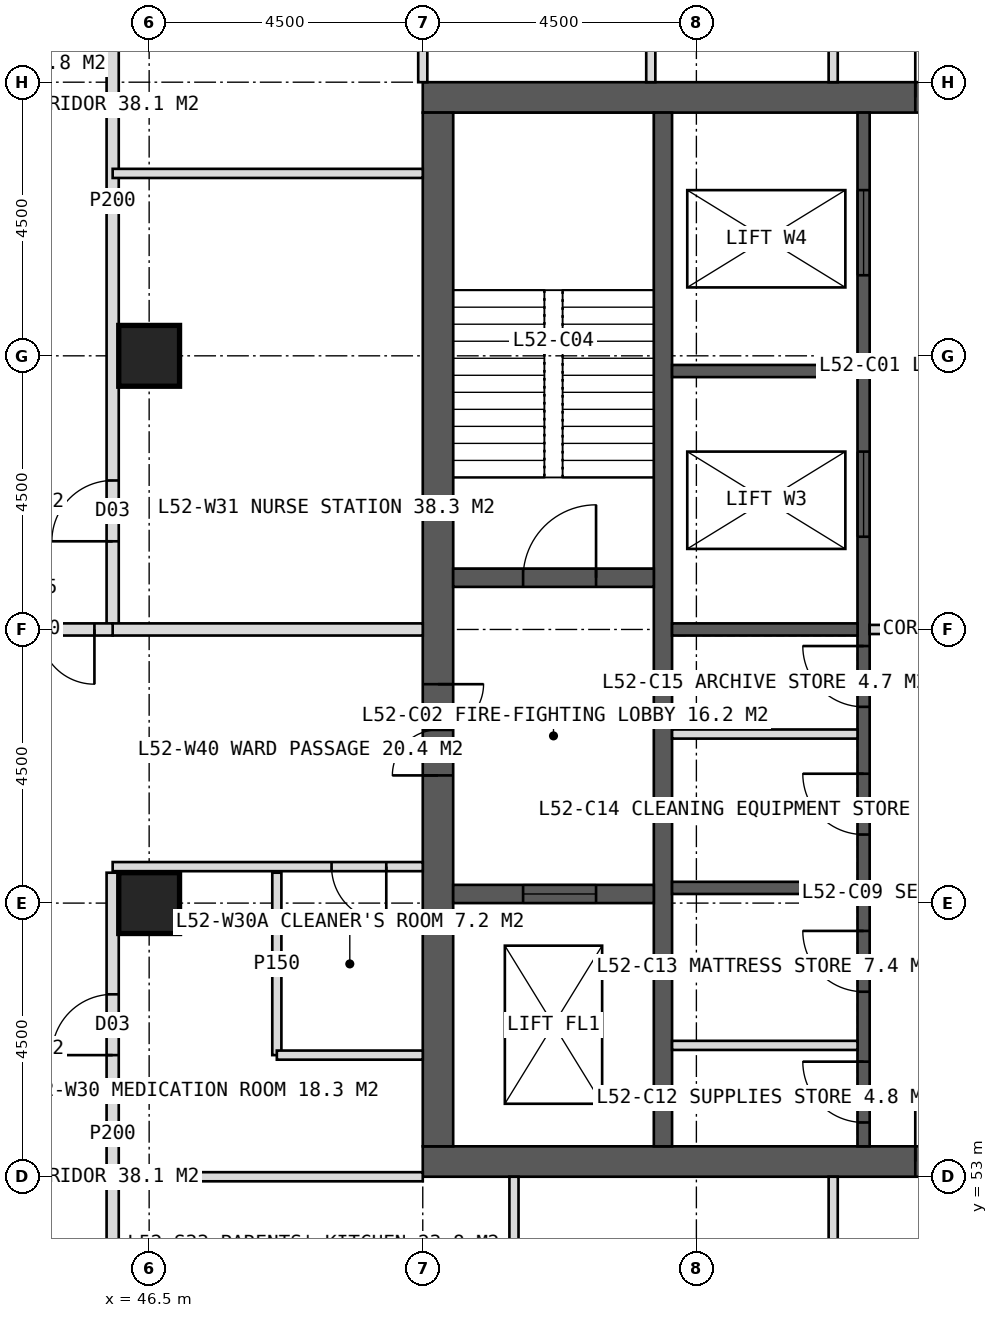
"""IFC4 building model, lengths in metres.
Left out: names, types, materials, properties, quantities, classifications, styles, units other than length and angle.
Written with IfcOpenShell. Run it as: python <this file> out.ifc"""

import sys

from ifc_helpers import new_model, si_unit, direction, frame, frame_2d, origin, origin_2d, place, context, subcontext, project, spatial, rectangle, hollow_rectangle, extrude, element, fill, save


model = new_model("IFC4")
c1 = context("Model", 3, precision=1e-05, world=origin(), true_north=direction((0.0, 1.0)))
c2 = subcontext(c1, "Body", "Model", "MODEL_VIEW")
j1 = project(units=[si_unit("LENGTHUNIT", "METRE"), si_unit("PLANEANGLEUNIT", "RADIAN")], contexts=[c1])
p1 = place(None, origin())
s1 = spatial("IfcSite", under=j1, at=p1, CompositionType="ELEMENT")
p2 = place(p1, origin())
s2 = spatial("IfcBuilding", under=s1, at=p2, CompositionType="ELEMENT")
p3 = place(p2, frame((0.0, 0.0, 217.0)))
s3 = spatial("IfcBuildingStorey", under=s2, at=p3, CompositionType="ELEMENT", Elevation=217.0)
p4 = place(p3, frame((51.0, 70.75, 0.0), z_axis=(0.0, 0.0, 1.0), x_axis=(1.0, 0.0, 0.0)))
e1 = element("IfcWall", 1, at=p4, inside=s3, PredefinedType="SHEAR", context=c2, shape_type="SweptSolid", body=[
    extrude(rectangle(XDim=18.0, YDim=0.5, at=frame_2d((9.0, 0.0))), origin(), (0.0, 0.0, 1.0), 4.0),
])
p5 = place(p4, frame((8.1, 0.0, 0.0)))
e2 = element("IfcOpeningElement", 2, at=p5, cuts=e1, PredefinedType="OPENING", context=c2, shape_type="SweptSolid", body=[
    extrude(rectangle(XDim=1.8, YDim=2.2, at=frame_2d((0.9, 1.1))), frame((0.0, 0.26, 0.0), z_axis=(0.0, -1.0, 0.0), x_axis=(1.0, 0.0, 0.0)), (0.0, 0.0, 1.0), 0.52),
])
p6 = place(p3, frame((51.0, 53.25, 0.0), z_axis=(0.0, 0.0, 1.0), x_axis=(1.0, 0.0, 0.0)))
e3 = element("IfcWall", 3, at=p6, inside=s3, PredefinedType="SHEAR", context=c2, shape_type="SweptSolid", body=[
    extrude(rectangle(XDim=18.0, YDim=0.5, at=frame_2d((9.0, 0.0))), origin(), (0.0, 0.0, 1.0), 4.0),
])
p7 = place(p6, frame((8.1, 0.0, 0.0)))
e4 = element("IfcOpeningElement", 4, at=p7, cuts=e3, PredefinedType="OPENING", context=c2, shape_type="SweptSolid", body=[
    extrude(rectangle(XDim=1.8, YDim=2.2, at=frame_2d((0.9, 1.1))), frame((0.0, 0.26, 0.0), z_axis=(0.0, -1.0, 0.0), x_axis=(1.0, 0.0, 0.0)), (0.0, 0.0, 1.0), 0.52),
])
p8 = place(p3, frame((51.25, 53.5, 0.0), z_axis=(0.0, 0.0, 1.0), x_axis=(0.0, 1.0, 0.0)))
e5 = element("IfcWall", 5, at=p8, inside=s3, PredefinedType="SHEAR", context=c2, shape_type="SweptSolid", body=[
    extrude(rectangle(XDim=17.0, YDim=0.5, at=frame_2d((8.5, 0.0))), origin(), (0.0, 0.0, 1.0), 4.0),
])
p9 = place(p8, frame((6.1, 0.0, 0.0)))
e6 = element("IfcOpeningElement", 6, at=p9, cuts=e5, PredefinedType="OPENING", context=c2, shape_type="SweptSolid", body=[
    extrude(rectangle(XDim=1.5, YDim=2.2, at=frame_2d((0.75, 1.1))), frame((0.0, 0.26, 0.0), z_axis=(0.0, -1.0, 0.0), x_axis=(1.0, 0.0, 0.0)), (0.0, 0.0, 1.0), 0.52),
])
p10 = place(p3, frame((54.95, 53.5, 0.0), z_axis=(0.0, 0.0, 1.0), x_axis=(0.0, 1.0, 0.0)))
e7 = element("IfcWall", 7, at=p10, inside=s3, PredefinedType="SHEAR", context=c2, shape_type="SweptSolid", body=[
    extrude(rectangle(XDim=17.0, YDim=0.3, at=frame_2d((8.5, 0.0))), origin(), (0.0, 0.0, 1.0), 4.0),
])
p11 = place(p3, frame((58.25, 53.5, 0.0), z_axis=(0.0, 0.0, 1.0), x_axis=(0.0, 1.0, 0.0)))
e8 = element("IfcWall", 8, at=p11, inside=s3, PredefinedType="SHEAR", context=c2, shape_type="SweptSolid", body=[
    extrude(rectangle(XDim=17.0, YDim=0.2, at=frame_2d((8.5, 0.0))), origin(), (0.0, 0.0, 1.0), 4.0),
])
p12 = place(p11, frame((0.393, 0.0, 0.0)))
e9 = element("IfcOpeningElement", 9, at=p12, cuts=e8, PredefinedType="OPENING", context=c2, shape_type="SweptSolid", body=[
    extrude(rectangle(XDim=1.0, YDim=2.1, at=frame_2d((0.5, 1.05))), frame((0.0, 0.11, 0.0), z_axis=(0.0, -1.0, 0.0), x_axis=(1.0, 0.0, 0.0)), (0.0, 0.0, 1.0), 0.22),
])
p13 = place(p11, frame((2.542, 0.0, 0.0)))
e10 = element("IfcOpeningElement", 10, at=p13, cuts=e8, PredefinedType="OPENING", context=c2, shape_type="SweptSolid", body=[
    extrude(rectangle(XDim=1.0, YDim=2.1, at=frame_2d((0.5, 1.05))), frame((0.0, 0.11, 0.0), z_axis=(0.0, -1.0, 0.0), x_axis=(1.0, 0.0, 0.0)), (0.0, 0.0, 1.0), 0.22),
])
p14 = place(p11, frame((5.127, 0.0, 0.0)))
e11 = element("IfcOpeningElement", 11, at=p14, cuts=e8, PredefinedType="OPENING", context=c2, shape_type="SweptSolid", body=[
    extrude(rectangle(XDim=1.0, YDim=2.1, at=frame_2d((0.5, 1.05))), frame((0.0, 0.11, 0.0), z_axis=(0.0, -1.0, 0.0), x_axis=(1.0, 0.0, 0.0)), (0.0, 0.0, 1.0), 0.22),
])
p15 = place(p11, frame((7.228, 0.0, 0.0)))
e12 = element("IfcOpeningElement", 12, at=p15, cuts=e8, PredefinedType="OPENING", context=c2, shape_type="SweptSolid", body=[
    extrude(rectangle(XDim=1.0, YDim=2.1, at=frame_2d((0.5, 1.05))), frame((0.0, 0.11, 0.0), z_axis=(0.0, -1.0, 0.0), x_axis=(1.0, 0.0, 0.0)), (0.0, 0.0, 1.0), 0.22),
])
p16 = place(p11, frame((10.025, 0.0, 0.0)))
e13 = element("IfcOpeningElement", 13, at=p16, cuts=e8, PredefinedType="OPENING", context=c2, shape_type="SweptSolid", body=[
    extrude(rectangle(XDim=1.4, YDim=2.2, at=frame_2d((0.7, 1.1))), frame((0.0, 0.11, 0.0), z_axis=(0.0, -1.0, 0.0), x_axis=(1.0, 0.0, 0.0)), (0.0, 0.0, 1.0), 0.22),
])
p17 = place(p11, frame((14.325, 0.0, 0.0)))
e14 = element("IfcOpeningElement", 14, at=p17, cuts=e8, PredefinedType="OPENING", context=c2, shape_type="SweptSolid", body=[
    extrude(rectangle(XDim=1.4, YDim=2.2, at=frame_2d((0.7, 1.1))), frame((0.0, 0.11, 0.0), z_axis=(0.0, -1.0, 0.0), x_axis=(1.0, 0.0, 0.0)), (0.0, 0.0, 1.0), 0.22),
])
for number, where, z_axis, x_axis in (
    (15, (55.1, 57.75, 0.0), (0.0, 0.0, 1.0), (1.0, 0.0, 0.0)),
    (16, (55.1, 62.0, 0.0), (0.0, 0.0, 1.0), (1.0, 0.0, 0.0)),
    (17, (55.1, 66.25, 0.0), (0.0, 0.0, 1.0), (1.0, 0.0, 0.0)),
):
    element("IfcWall", number, at=place(p3, frame(where, z_axis=z_axis, x_axis=x_axis)), inside=s3, PredefinedType="SHEAR", context=c2, shape_type="SweptSolid", body=[
        extrude(rectangle(XDim=3.05, YDim=0.2, at=frame_2d((1.525, 0.0))), origin(), (0.0, 0.0, 1.0), 4.0),
    ])
p18 = place(p3, frame((51.5, 62.85, 0.0), z_axis=(0.0, 0.0, 1.0), x_axis=(1.0, 0.0, 0.0)))
e18 = element("IfcWall", 18, at=p18, inside=s3, PredefinedType="SHEAR", context=c2, shape_type="SweptSolid", body=[
    extrude(rectangle(XDim=3.3, YDim=0.3, at=frame_2d((1.65, 0.0))), origin(), (0.0, 0.0, 1.0), 4.0),
])
p19 = place(p18, frame((1.15, 0.0, 0.0)))
e19 = element("IfcOpeningElement", 19, at=p19, cuts=e18, PredefinedType="OPENING", context=c2, shape_type="SweptSolid", body=[
    extrude(rectangle(XDim=1.2, YDim=2.1, at=frame_2d((0.6, 1.05))), frame((0.0, 0.16, 0.0), z_axis=(0.0, -1.0, 0.0), x_axis=(1.0, 0.0, 0.0)), (0.0, 0.0, 1.0), 0.32),
])
p20 = place(p3, frame((51.5, 57.65, 0.0), z_axis=(0.0, 0.0, 1.0), x_axis=(1.0, 0.0, 0.0)))
e20 = element("IfcWall", 20, at=p20, inside=s3, PredefinedType="SHEAR", context=c2, shape_type="SweptSolid", body=[
    extrude(rectangle(XDim=3.3, YDim=0.3, at=frame_2d((1.65, 0.0))), origin(), (0.0, 0.0, 1.0), 4.0),
])
p21 = place(p20, frame((1.15, 0.0, 0.0)))
e21 = element("IfcOpeningElement", 21, at=p21, cuts=e20, PredefinedType="OPENING", context=c2, shape_type="SweptSolid", body=[
    extrude(rectangle(XDim=1.2, YDim=2.2, at=frame_2d((0.6, 1.1))), frame((0.0, 0.16, 0.0), z_axis=(0.0, -1.0, 0.0), x_axis=(1.0, 0.0, 0.0)), (0.0, 0.0, 1.0), 0.32),
])
for number, where, z_axis, x_axis in (
    (22, (46.5, 57.5, 0.0), (0.0, 0.0, 1.0), (1.0, 0.0, 0.0)),
    (23, (46.5, 66.5, 0.0), (0.0, 0.0, 1.0), (1.0, 0.0, 0.0)),
):
    element("IfcColumn", number, at=place(p3, frame(where, z_axis=z_axis, x_axis=x_axis)), inside=s3, PredefinedType="COLUMN", context=c2, shape_type="SweptSolid", body=[
        extrude(hollow_rectangle(XDim=1.0, YDim=1.0, WallThickness=0.1, at=origin_2d()), origin(), (0.0, 0.0, 1.0), 4.0),
    ])
p22 = place(p3, frame((51.0, 71.0, 0.0), z_axis=(0.0, 0.0, 1.0), x_axis=(0.0, 1.0, 0.0)))
e24 = element("IfcWall", 24, at=p22, inside=s3, PredefinedType="PARTITIONING", context=c2, shape_type="SweptSolid", body=[
    extrude(rectangle(XDim=5.1, YDim=0.15, at=frame_2d((2.55, 0.0))), origin(), (0.0, 0.0, 1.0), 3.75),
])
p23 = place(p3, frame((57.75, 71.0, 0.0), z_axis=(0.0, 0.0, 1.0), x_axis=(0.0, 1.0, 0.0)))
e25 = element("IfcWall", 25, at=p23, inside=s3, PredefinedType="PARTITIONING", context=c2, shape_type="SweptSolid", body=[
    extrude(rectangle(XDim=3.6, YDim=0.15, at=frame_2d((1.8, 0.0))), origin(), (0.0, 0.0, 1.0), 3.75),
])
p24 = place(p23, frame((0.6, 0.0, 0.0)))
e26 = element("IfcOpeningElement", 26, at=p24, cuts=e25, PredefinedType="OPENING", context=c2, shape_type="SweptSolid", body=[
    extrude(rectangle(XDim=0.9, YDim=2.1, at=frame_2d((0.45, 1.05))), frame((0.0, 0.085, 0.0), z_axis=(0.0, -1.0, 0.0), x_axis=(1.0, 0.0, 0.0)), (0.0, 0.0, 1.0), 0.17),
])
p25 = place(p3, frame((54.75, 71.0, 0.0), z_axis=(0.0, 0.0, 1.0), x_axis=(0.0, 1.0, 0.0)))
e27 = element("IfcWall", 27, at=p25, inside=s3, PredefinedType="PARTITIONING", context=c2, shape_type="SweptSolid", body=[
    extrude(rectangle(XDim=2.4, YDim=0.15, at=frame_2d((1.2, 0.0))), origin(), (0.0, 0.0, 1.0), 3.75),
])
p26 = place(p3, frame((51.0, 53.0, 0.0), z_axis=(0.0, 0.0, 1.0), x_axis=(-1.0, 0.0, 0.0)))
e28 = element("IfcWall", 28, at=p26, inside=s3, PredefinedType="PARTITIONING", context=c2, shape_type="SweptSolid", body=[
    extrude(rectangle(XDim=5.1, YDim=0.15, at=frame_2d((2.55, 0.0))), origin(), (0.0, 0.0, 1.0), 3.75),
])
p27 = place(p3, frame((45.9, 49.4, 0.0), z_axis=(0.0, 0.0, 1.0), x_axis=(0.0, 1.0, 0.0)))
e29 = element("IfcWall", 29, at=p27, inside=s3, PredefinedType="PARTITIONING", context=c2, shape_type="SweptSolid", body=[
    extrude(rectangle(XDim=8.6, YDim=0.2, at=frame_2d((4.3, 0.0))), origin(), (0.0, 0.0, 1.0), 3.75),
])
p28 = place(p27, frame((5.6, 0.0, 0.0)))
e30 = element("IfcOpeningElement", 30, at=p28, cuts=e29, PredefinedType="OPENING", context=c2, shape_type="SweptSolid", body=[
    extrude(rectangle(XDim=1.0, YDim=2.1, at=frame_2d((0.5, 1.05))), frame((0.0, 0.11, 0.0), z_axis=(0.0, -1.0, 0.0), x_axis=(1.0, 0.0, 0.0)), (0.0, 0.0, 1.0), 0.22),
])
p29 = place(p3, frame((45.9, 62.0, 0.0), z_axis=(0.0, 0.0, 1.0), x_axis=(0.0, 1.0, 0.0)))
e31 = element("IfcWall", 31, at=p29, inside=s3, PredefinedType="PARTITIONING", context=c2, shape_type="SweptSolid", body=[
    extrude(rectangle(XDim=14.1, YDim=0.2, at=frame_2d((7.05, 0.0))), origin(), (0.0, 0.0, 1.0), 3.75),
])
p30 = place(p29, frame((1.45, 0.0, 0.0)))
e32 = element("IfcOpeningElement", 32, at=p30, cuts=e31, PredefinedType="OPENING", context=c2, shape_type="SweptSolid", body=[
    extrude(rectangle(XDim=1.0, YDim=2.1, at=frame_2d((0.5, 1.05))), frame((0.0, 0.11, 0.0), z_axis=(0.0, -1.0, 0.0), x_axis=(1.0, 0.0, 0.0)), (0.0, 0.0, 1.0), 0.22),
])
p31 = place(p29, frame((10.3, 0.0, 0.0)))
e33 = element("IfcOpeningElement", 33, at=p31, cuts=e31, PredefinedType="OPENING", context=c2, shape_type="SweptSolid", body=[
    extrude(rectangle(XDim=1.0, YDim=2.1, at=frame_2d((0.5, 1.05))), frame((0.0, 0.11, 0.0), z_axis=(0.0, -1.0, 0.0), x_axis=(1.0, 0.0, 0.0)), (0.0, 0.0, 1.0), 0.22),
])
p32 = place(p3, frame((51.0, 58.1, 0.0), z_axis=(0.0, 0.0, 1.0), x_axis=(-1.0, 0.0, 0.0)))
e34 = element("IfcWall", 34, at=p32, inside=s3, PredefinedType="PARTITIONING", context=c2, shape_type="SweptSolid", body=[
    extrude(rectangle(XDim=5.1, YDim=0.15, at=frame_2d((2.55, 0.0))), origin(), (0.0, 0.0, 1.0), 3.75),
])
p33 = place(p32, frame((0.6, 0.0, 0.0)))
e35 = element("IfcOpeningElement", 35, at=p33, cuts=e34, PredefinedType="OPENING", context=c2, shape_type="SweptSolid", body=[
    extrude(rectangle(XDim=0.9, YDim=2.1, at=frame_2d((0.45, 1.05))), frame((0.0, 0.085, 0.0), z_axis=(0.0, -1.0, 0.0), x_axis=(1.0, 0.0, 0.0)), (0.0, 0.0, 1.0), 0.17),
])
p34 = place(p3, frame((51.0, 62.0, 0.0), z_axis=(0.0, 0.0, 1.0), x_axis=(-1.0, 0.0, 0.0)))
e36 = element("IfcWall", 36, at=p34, inside=s3, PredefinedType="SOLIDWALL", context=c2, shape_type="SweptSolid", body=[
    extrude(rectangle(XDim=5.1, YDim=0.2, at=frame_2d((2.55, 0.0))), origin(), (0.0, 0.0, 1.0), 2.95),
])
p35 = place(p3, frame((51.0, 69.5, 0.0), z_axis=(0.0, 0.0, 1.0), x_axis=(-1.0, 0.0, 0.0)))
e37 = element("IfcWall", 37, at=p35, inside=s3, PredefinedType="PARTITIONING", context=c2, shape_type="SweptSolid", body=[
    extrude(rectangle(XDim=5.1, YDim=0.15, at=frame_2d((2.55, 0.0))), origin(), (0.0, 0.0, 1.0), 3.75),
])
p36 = place(p3, frame((48.6, 55.0, 0.0), z_axis=(0.0, 0.0, 1.0), x_axis=(0.0, 1.0, 0.0)))
e38 = element("IfcWall", 38, at=p36, inside=s3, PredefinedType="PARTITIONING", context=c2, shape_type="SweptSolid", body=[
    extrude(rectangle(XDim=3.0, YDim=0.15, at=frame_2d((1.5, 0.0))), origin(), (0.0, 0.0, 1.0), 3.75),
])
p37 = place(p3, frame((51.0, 55.0, 0.0), z_axis=(0.0, 0.0, 1.0), x_axis=(-1.0, 0.0, 0.0)))
e39 = element("IfcWall", 39, at=p37, inside=s3, PredefinedType="PARTITIONING", context=c2, shape_type="SweptSolid", body=[
    extrude(rectangle(XDim=2.4, YDim=0.15, at=frame_2d((1.2, 0.0))), origin(), (0.0, 0.0, 1.0), 3.75),
])
for number, where, z_axis, x_axis in (
    (40, (57.75, 53.0, 0.0), (0.0, 0.0, 1.0), (0.0, -1.0, 0.0)),
    (41, (52.5, 53.0, 0.0), (0.0, 0.0, 1.0), (0.0, -1.0, 0.0)),
):
    element("IfcWall", number, at=place(p3, frame(where, z_axis=z_axis, x_axis=x_axis)), inside=s3, PredefinedType="PARTITIONING", context=c2, shape_type="SweptSolid", body=[
        extrude(rectangle(XDim=3.6, YDim=0.15, at=frame_2d((1.8, 0.0))), origin(), (0.0, 0.0, 1.0), 3.75),
    ])
p38 = place(p3, frame((45.9, 62.0, 0.0), z_axis=(0.0, 0.0, 1.0), x_axis=(-1.0, 0.0, 0.0)))
e42 = element("IfcWall", 42, at=p38, inside=s3, PredefinedType="SOLIDWALL", context=c2, shape_type="SweptSolid", body=[
    extrude(rectangle(XDim=2.7, YDim=0.2, at=frame_2d((1.35, 0.0))), origin(), (0.0, 0.0, 1.0), 2.95),
])
p39 = place(p38, frame((0.3, 0.0, 0.0)))
e43 = element("IfcOpeningElement", 43, at=p39, cuts=e42, PredefinedType="OPENING", context=c2, shape_type="SweptSolid", body=[
    extrude(rectangle(XDim=1.8, YDim=2.2, at=frame_2d((0.9, 1.1))), frame((0.0, 0.11, 0.0), z_axis=(0.0, -1.0, 0.0), x_axis=(1.0, 0.0, 0.0)), (0.0, 0.0, 1.0), 0.22),
])
for number, where, z_axis, x_axis in (
    (44, (55.1, 55.16, 0.0), (0.0, 0.0, 1.0), (1.0, 0.0, 0.0)),
    (45, (55.1, 60.28, 0.0), (0.0, 0.0, 1.0), (1.0, 0.0, 0.0)),
):
    element("IfcWall", number, at=place(p3, frame(where, z_axis=z_axis, x_axis=x_axis)), inside=s3, PredefinedType="PARTITIONING", context=c2, shape_type="SweptSolid", body=[
        extrude(rectangle(XDim=3.05, YDim=0.15, at=frame_2d((1.525, 0.0))), origin(), (0.0, 0.0, 1.0), 3.75),
    ])
p40 = place(p3, frame((58.35, 62.0, 0.0), z_axis=(0.0, 0.0, 1.0), x_axis=(1.0, 0.0, 0.0)))
e46 = element("IfcWall", 46, at=p40, inside=s3, PredefinedType="PARTITIONING", context=c2, shape_type="SweptSolid", body=[
    extrude(rectangle(XDim=3.3, YDim=0.15, at=frame_2d((1.65, 0.0))), origin(), (0.0, 0.0, 1.0), 3.75),
])
p41 = place(p33, origin())
e47 = element("IfcDoor", 47, at=p41, inside=s3, OperationType="SINGLE_SWING_LEFT", PredefinedType="DOOR", context=c2, shape_type="SweptSolid", body=[
    extrude(rectangle(XDim=0.9, YDim=2.1, at=frame_2d((0.45, 1.05))), frame((0.0, 0.025, 0.0), z_axis=(0.0, -1.0, 0.0), x_axis=(1.0, 0.0, 0.0)), (0.0, 0.0, 1.0), 0.05),
])
fill(e35, e47)
p42 = place(p28, origin())
e48 = element("IfcDoor", 48, at=p42, inside=s3, OperationType="SINGLE_SWING_LEFT", PredefinedType="DOOR", context=c2, shape_type="SweptSolid", body=[
    extrude(rectangle(XDim=1.0, YDim=2.1, at=frame_2d((0.5, 1.05))), frame((0.0, 0.025, 0.0), z_axis=(0.0, -1.0, 0.0), x_axis=(1.0, 0.0, 0.0)), (0.0, 0.0, 1.0), 0.05),
])
fill(e30, e48)
p43 = place(p30, origin())
e49 = element("IfcDoor", 49, at=p43, inside=s3, OperationType="SINGLE_SWING_LEFT", PredefinedType="DOOR", context=c2, shape_type="SweptSolid", body=[
    extrude(rectangle(XDim=1.0, YDim=2.1, at=frame_2d((0.5, 1.05))), frame((0.0, 0.025, 0.0), z_axis=(0.0, -1.0, 0.0), x_axis=(1.0, 0.0, 0.0)), (0.0, 0.0, 1.0), 0.05),
])
fill(e32, e49)
p44 = place(p39, origin())
e50 = element("IfcDoor", 50, at=p44, inside=s3, OperationType="DOUBLE_DOOR_DOUBLE_SWING", PredefinedType="DOOR", context=c2, shape_type="SweptSolid", body=[
    extrude(rectangle(XDim=1.8, YDim=2.2, at=frame_2d((0.9, 1.1))), frame((0.0, 0.025, 0.0), z_axis=(0.0, -1.0, 0.0), x_axis=(1.0, 0.0, 0.0)), (0.0, 0.0, 1.0), 0.05),
])
fill(e43, e50)
p45 = place(p5, origin())
e51 = element("IfcDoor", 51, at=p45, inside=s3, OperationType="DOUBLE_DOOR_SINGLE_SWING", PredefinedType="DOOR", context=c2, shape_type="SweptSolid", body=[
    extrude(rectangle(XDim=1.8, YDim=2.2, at=frame_2d((0.9, 1.1))), frame((0.0, 0.025, 0.0), z_axis=(0.0, -1.0, 0.0), x_axis=(1.0, 0.0, 0.0)), (0.0, 0.0, 1.0), 0.05),
])
fill(e2, e51)
p46 = place(p9, origin())
e52 = element("IfcDoor", 52, at=p46, inside=s3, OperationType="DOUBLE_DOOR_SINGLE_SWING", PredefinedType="DOOR", context=c2, shape_type="SweptSolid", body=[
    extrude(rectangle(XDim=1.5, YDim=2.2, at=frame_2d((0.75, 1.1))), frame((0.0, 0.025, 0.0), z_axis=(0.0, -1.0, 0.0), x_axis=(1.0, 0.0, 0.0)), (0.0, 0.0, 1.0), 0.05),
])
fill(e6, e52)
p47 = place(p19, origin())
e53 = element("IfcDoor", 53, at=p47, inside=s3, OperationType="SINGLE_SWING_RIGHT", PredefinedType="DOOR", context=c2, shape_type="SweptSolid", body=[
    extrude(rectangle(XDim=1.2, YDim=2.1, at=frame_2d((0.6, 1.05))), frame((0.0, 0.025, 0.0), z_axis=(0.0, -1.0, 0.0), x_axis=(1.0, 0.0, 0.0)), (0.0, 0.0, 1.0), 0.05),
])
fill(e19, e53)
p48 = place(p21, origin())
e54 = element("IfcDoor", 54, at=p48, inside=s3, OperationType="SLIDING_TO_LEFT", PredefinedType="DOOR", context=c2, shape_type="SweptSolid", body=[
    extrude(rectangle(XDim=1.2, YDim=2.2, at=frame_2d((0.6, 1.1))), frame((0.0, 0.025, 0.0), z_axis=(0.0, -1.0, 0.0), x_axis=(1.0, 0.0, 0.0)), (0.0, 0.0, 1.0), 0.05),
])
fill(e21, e54)
p49 = place(p12, origin())
e55 = element("IfcDoor", 55, at=p49, inside=s3, OperationType="SINGLE_SWING_RIGHT", PredefinedType="DOOR", context=c2, shape_type="SweptSolid", body=[
    extrude(rectangle(XDim=1.0, YDim=2.1, at=frame_2d((0.5, 1.05))), frame((0.0, 0.025, 0.0), z_axis=(0.0, -1.0, 0.0), x_axis=(1.0, 0.0, 0.0)), (0.0, 0.0, 1.0), 0.05),
])
fill(e9, e55)
p50 = place(p13, origin())
e56 = element("IfcDoor", 56, at=p50, inside=s3, OperationType="SINGLE_SWING_RIGHT", PredefinedType="DOOR", context=c2, shape_type="SweptSolid", body=[
    extrude(rectangle(XDim=1.0, YDim=2.1, at=frame_2d((0.5, 1.05))), frame((0.0, 0.025, 0.0), z_axis=(0.0, -1.0, 0.0), x_axis=(1.0, 0.0, 0.0)), (0.0, 0.0, 1.0), 0.05),
])
fill(e10, e56)
p51 = place(p14, origin())
e57 = element("IfcDoor", 57, at=p51, inside=s3, OperationType="SINGLE_SWING_RIGHT", PredefinedType="DOOR", context=c2, shape_type="SweptSolid", body=[
    extrude(rectangle(XDim=1.0, YDim=2.1, at=frame_2d((0.5, 1.05))), frame((0.0, 0.025, 0.0), z_axis=(0.0, -1.0, 0.0), x_axis=(1.0, 0.0, 0.0)), (0.0, 0.0, 1.0), 0.05),
])
fill(e11, e57)
p52 = place(p15, origin())
e58 = element("IfcDoor", 58, at=p52, inside=s3, OperationType="SINGLE_SWING_RIGHT", PredefinedType="DOOR", context=c2, shape_type="SweptSolid", body=[
    extrude(rectangle(XDim=1.0, YDim=2.1, at=frame_2d((0.5, 1.05))), frame((0.0, 0.025, 0.0), z_axis=(0.0, -1.0, 0.0), x_axis=(1.0, 0.0, 0.0)), (0.0, 0.0, 1.0), 0.05),
])
fill(e12, e58)
p53 = place(p16, origin())
e59 = element("IfcDoor", 59, at=p53, inside=s3, OperationType="SLIDING_TO_LEFT", PredefinedType="DOOR", context=c2, shape_type="SweptSolid", body=[
    extrude(rectangle(XDim=1.4, YDim=2.2, at=frame_2d((0.7, 1.1))), frame((0.0, 0.025, 0.0), z_axis=(0.0, -1.0, 0.0), x_axis=(1.0, 0.0, 0.0)), (0.0, 0.0, 1.0), 0.05),
])
fill(e13, e59)
p54 = place(p17, origin())
e60 = element("IfcDoor", 60, at=p54, inside=s3, OperationType="SLIDING_TO_LEFT", PredefinedType="DOOR", context=c2, shape_type="SweptSolid", body=[
    extrude(rectangle(XDim=1.4, YDim=2.2, at=frame_2d((0.7, 1.1))), frame((0.0, 0.025, 0.0), z_axis=(0.0, -1.0, 0.0), x_axis=(1.0, 0.0, 0.0)), (0.0, 0.0, 1.0), 0.05),
])
fill(e14, e60)
p55 = place(p7, origin())
e61 = element("IfcDoor", 61, at=p55, inside=s3, OperationType="DOUBLE_DOOR_SINGLE_SWING", PredefinedType="DOOR", context=c2, shape_type="SweptSolid", body=[
    extrude(rectangle(XDim=1.8, YDim=2.2, at=frame_2d((0.9, 1.1))), frame((0.0, 0.025, 0.0), z_axis=(0.0, -1.0, 0.0), x_axis=(1.0, 0.0, 0.0)), (0.0, 0.0, 1.0), 0.05),
])
fill(e4, e61)
save(model, sys.argv[1])
